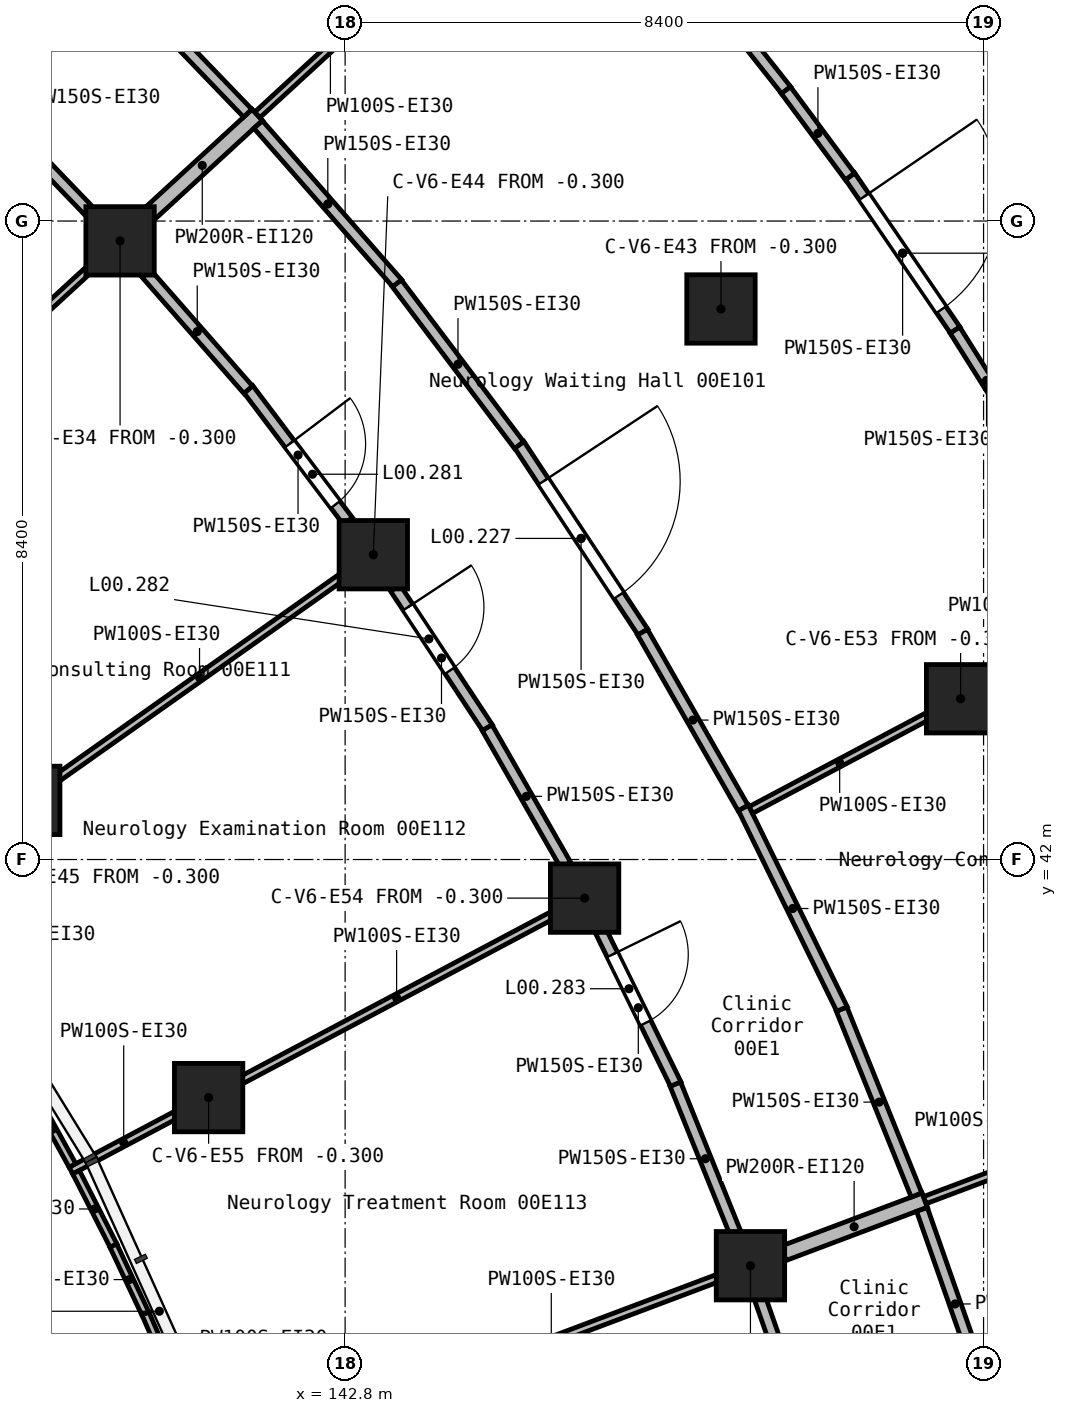
"""IFC4 building model, lengths in metres.
Left out: names, types, materials, properties, quantities, classifications, styles, units other than length and angle.
Written with IfcOpenShell. Run it as: python <this file> out.ifc"""

import sys

from ifc_helpers import new_model, si_unit, direction, frame, frame_2d, origin, origin_2d, place, context, subcontext, project, spatial, rectangle, extrude, element, fill, save


model = new_model("IFC4")
c1 = context("Model", 3, precision=1e-05, world=origin(), true_north=direction((0.0, 1.0)))
c2 = subcontext(c1, "Body", "Model", "MODEL_VIEW")
j1 = project(units=[si_unit("LENGTHUNIT", "METRE"), si_unit("PLANEANGLEUNIT", "RADIAN")], contexts=[c1])
p1 = place(None, origin())
s1 = spatial("IfcSite", under=j1, at=p1, CompositionType="ELEMENT")
p2 = place(p1, origin())
s2 = spatial("IfcBuilding", under=s1, at=p2, CompositionType="ELEMENT")
p3 = place(p2, origin())
s3 = spatial("IfcBuildingStorey", under=s2, at=p3, CompositionType="ELEMENT", Elevation=0.0)
for number, where, z_axis, x_axis in (
    (1, (138.598, 42.778, -0.3), (0.0, 0.0, 1.0), (1.0, 0.0, 0.0)),
    (2, (139.839, 50.139, -0.3), (0.0, 0.0, 1.0), (1.0, 0.0, 0.0)),
    (3, (141.004, 38.868, -0.3), (0.0, 0.0, 1.0), (1.0, 0.0, 0.0)),
    (4, (143.171, 46.01, -0.3), (0.0, 0.0, 1.0), (1.0, 0.0, 0.0)),
    (5, (145.951, 41.492, -0.3), (0.0, 0.0, 1.0), (1.0, 0.0, 0.0)),
    (6, (147.745, 49.243, -0.3), (0.0, 0.0, 1.0), (1.0, 0.0, 0.0)),
    (7, (148.133, 36.656, -0.3), (0.0, 0.0, 1.0), (1.0, 0.0, 0.0)),
    (8, (150.898, 44.115, -0.3), (0.0, 0.0, 1.0), (1.0, 0.0, 0.0)),
):
    element("IfcColumn", number, at=place(p3, frame(where, z_axis=z_axis, x_axis=x_axis)), inside=s3, PredefinedType="COLUMN", context=c2, shape_type="SweptSolid", body=[
        extrude(rectangle(XDim=0.9, YDim=0.9, at=origin_2d()), origin(), (0.0, 0.0, 1.0), 5.7),
    ])
p4 = place(p3, frame((140.196, 50.467, 0.0), z_axis=(0.0, 0.0, 1.0), x_axis=(0.736519787736, 0.676415997943, 0.0)))
e9 = element("IfcWall", 9, at=p4, inside=s3, PredefinedType="SOLIDWALL", context=c2, shape_type="SweptSolid", body=[
    extrude(rectangle(XDim=1.966, YDim=0.2, at=frame_2d((0.983, 0.0))), origin(), (0.0, 0.0, 1.0), 5.05),
])
p5 = place(p3, frame((148.567, 36.819, 0.0), z_axis=(0.0, 0.0, 1.0), x_axis=(0.935934561344, 0.352173958268, 0.0)))
e10 = element("IfcWall", 10, at=p5, inside=s3, PredefinedType="SOLIDWALL", context=c2, shape_type="SweptSolid", body=[
    extrude(rectangle(XDim=1.986, YDim=0.2, at=frame_2d((0.993, 0.0))), origin(), (0.0, 0.0, 1.0), 5.05),
])
p6 = place(p3, frame((148.038, 42.683, 0.0), z_axis=(0.0, 0.0, 1.0), x_axis=(0.440200278942, -0.897899612663, 0.0)))
e11 = element("IfcWall", 11, at=p6, inside=s3, PredefinedType="PARTITIONING", context=c2, shape_type="SweptSolid", body=[
    extrude(rectangle(XDim=2.958, YDim=0.15, at=frame_2d((1.479, 0.0))), origin(), (0.0, 0.0, 1.0), 5.05),
])
p7 = place(p3, frame((145.09, 47.458, 0.0), z_axis=(0.0, 0.0, 1.0), x_axis=(0.551018151494, -0.834493257447, 0.0)))
e12 = element("IfcWall", 12, at=p7, inside=s3, PredefinedType="PARTITIONING", context=c2, shape_type="SweptSolid", body=[
    extrude(rectangle(XDim=2.958, YDim=0.15, at=frame_2d((1.479, 0.0))), origin(), (0.0, 0.0, 1.0), 5.05),
])
p8 = place(p7, frame((0.579, 0.0, 0.0)))
e13 = element("IfcOpeningElement", 13, at=p8, cuts=e12, PredefinedType="OPENING", context=c2, shape_type="SweptSolid", body=[
    extrude(rectangle(XDim=1.8, YDim=2.1, at=frame_2d((0.9, 1.05))), frame((0.0, 0.085, 0.0), z_axis=(0.0, -1.0, 0.0), x_axis=(1.0, 0.0, 0.0)), (0.0, 0.0, 1.0), 0.17),
])
p9 = place(p3, frame((146.713, 44.992, 0.0), z_axis=(0.0, 0.0, 1.0), x_axis=(0.49622768999, -0.868192420888, 0.0)))
e14 = element("IfcWall", 14, at=p9, inside=s3, PredefinedType="PARTITIONING", context=c2, shape_type="SweptSolid", body=[
    extrude(rectangle(XDim=2.666, YDim=0.15, at=frame_2d((1.333, 0.0))), origin(), (0.0, 0.0, 1.0), 5.05),
])
p10 = place(p3, frame((141.656, 51.669, 0.0), z_axis=(0.0, 0.0, 1.0), x_axis=(0.659076402407, -0.752075990702, 0.0)))
e15 = element("IfcWall", 15, at=p10, inside=s3, PredefinedType="PARTITIONING", context=c2, shape_type="SweptSolid", body=[
    extrude(rectangle(XDim=2.78, YDim=0.15, at=frame_2d((1.39, 0.0))), origin(), (0.0, 0.0, 1.0), 5.05),
])
p11 = place(p3, frame((149.333, 40.03, 0.0), z_axis=(0.0, 0.0, 1.0), x_axis=(0.373865497673, -0.927482932269, 0.0)))
e16 = element("IfcWall", 16, at=p11, inside=s3, PredefinedType="PARTITIONING", context=c2, shape_type="SweptSolid", body=[
    extrude(rectangle(XDim=2.635, YDim=0.15, at=frame_2d((1.317, 0.0))), origin(), (0.0, 0.0, 1.0), 5.05),
])
p12 = place(p3, frame((143.481, 49.579, 0.0), z_axis=(0.0, 0.0, 1.0), x_axis=(0.602824021104, -0.797874175281, 0.0)))
e17 = element("IfcWall", 17, at=p12, inside=s3, PredefinedType="PARTITIONING", context=c2, shape_type="SweptSolid", body=[
    extrude(rectangle(XDim=2.666, YDim=0.15, at=frame_2d((1.333, 0.0))), origin(), (0.0, 0.0, 1.0), 5.05),
])
p13 = place(p3, frame((139.691, 53.718, 0.0), z_axis=(0.0, 0.0, 1.0), x_axis=(0.693447550136, -0.720507109757, 0.0)))
e18 = element("IfcWall", 18, at=p13, inside=s3, PredefinedType="PARTITIONING", context=c2, shape_type="SweptSolid", body=[
    extrude(rectangle(XDim=2.635, YDim=0.15, at=frame_2d((1.317, 0.0))), origin(), (0.0, 0.0, 1.0), 5.05),
])
p14 = place(p3, frame((150.39, 37.396, 0.0), z_axis=(0.0, 0.0, 1.0), x_axis=(0.330759074405, -0.943715229663, 0.0)))
e19 = element("IfcWall", 19, at=p14, inside=s3, PredefinedType="PARTITIONING", context=c2, shape_type="SweptSolid", body=[
    extrude(rectangle(XDim=2.634, YDim=0.15, at=frame_2d((1.317, 0.0))), origin(), (0.0, 0.0, 1.0), 5.05),
])
p15 = place(p3, frame((146.163, 41.06, 0.0), z_axis=(0.0, 0.0, 1.0), x_axis=(0.439946079235, -0.898024190858, 0.0)))
e20 = element("IfcWall", 20, at=p15, inside=s3, PredefinedType="PARTITIONING", context=c2, shape_type="SweptSolid", body=[
    extrude(rectangle(XDim=2.249, YDim=0.15, at=frame_2d((1.124, 0.0))), origin(), (0.0, 0.0, 1.0), 5.05),
])
p16 = place(p15, frame((0.346, 0.0, 0.0)))
e21 = element("IfcOpeningElement", 21, at=p16, cuts=e20, PredefinedType="OPENING", context=c2, shape_type="SweptSolid", body=[
    extrude(rectangle(XDim=1.0, YDim=2.1, at=frame_2d((0.5, 1.05))), frame((0.0, 0.085, 0.0), z_axis=(0.0, -1.0, 0.0), x_axis=(1.0, 0.0, 0.0)), (0.0, 0.0, 1.0), 0.17),
])
p17 = place(p3, frame((141.526, 48.188, 0.0), z_axis=(0.0, 0.0, 1.0), x_axis=(0.60280129331, -0.797891346477, 0.0)))
e22 = element("IfcWall", 22, at=p17, inside=s3, PredefinedType="PARTITIONING", context=c2, shape_type="SweptSolid", body=[
    extrude(rectangle(XDim=2.172, YDim=0.15, at=frame_2d((1.086, 0.0))), origin(), (0.0, 0.0, 1.0), 5.05),
])
p18 = place(p17, frame((0.902, 0.0, 0.0)))
e23 = element("IfcOpeningElement", 23, at=p18, cuts=e22, PredefinedType="OPENING", context=c2, shape_type="SweptSolid", body=[
    extrude(rectangle(XDim=1.0, YDim=2.1, at=frame_2d((0.5, 1.05))), frame((0.0, 0.085, 0.0), z_axis=(0.0, -1.0, 0.0), x_axis=(1.0, 0.0, 0.0)), (0.0, 0.0, 1.0), 0.17),
])
p19 = place(p3, frame((143.462, 45.57, 0.0), z_axis=(0.0, 0.0, 1.0), x_axis=(0.550880835548, -0.834583911315, 0.0)))
e24 = element("IfcWall", 24, at=p19, inside=s3, PredefinedType="PARTITIONING", context=c2, shape_type="SweptSolid", body=[
    extrude(rectangle(XDim=2.201, YDim=0.15, at=frame_2d((1.101, 0.0))), origin(), (0.0, 0.0, 1.0), 5.05),
])
p20 = place(p19, frame((0.299, 0.0, 0.0)))
e25 = element("IfcOpeningElement", 25, at=p20, cuts=e24, PredefinedType="OPENING", context=c2, shape_type="SweptSolid", body=[
    extrude(rectangle(XDim=1.0, YDim=2.1, at=frame_2d((0.5, 1.05))), frame((0.0, 0.085, 0.0), z_axis=(0.0, -1.0, 0.0), x_axis=(1.0, 0.0, 0.0)), (0.0, 0.0, 1.0), 0.17),
])
p21 = place(p3, frame((144.668, 43.734, 0.0), z_axis=(0.0, 0.0, 1.0), x_axis=(0.496694973164, -0.867925171679, 0.0)))
e26 = element("IfcWall", 26, at=p21, inside=s3, PredefinedType="PARTITIONING", context=c2, shape_type="SweptSolid", body=[
    extrude(rectangle(XDim=2.08, YDim=0.15, at=frame_2d((1.04, 0.0))), origin(), (0.0, 0.0, 1.0), 5.05),
])
p22 = place(p3, frame((147.145, 39.043, 0.0), z_axis=(0.0, 0.0, 1.0), x_axis=(0.373899406404, -0.927469263043, 0.0)))
e27 = element("IfcWall", 27, at=p22, inside=s3, PredefinedType="PARTITIONING", context=c2, shape_type="SweptSolid", body=[
    extrude(rectangle(XDim=2.113, YDim=0.15, at=frame_2d((1.057, 0.0))), origin(), (0.0, 0.0, 1.0), 5.05),
])
p23 = place(p3, frame((148.257, 36.232, 0.0), z_axis=(0.0, 0.0, 1.0), x_axis=(0.330477279651, -0.943813947574, 0.0)))
e28 = element("IfcWall", 28, at=p23, inside=s3, PredefinedType="PARTITIONING", context=c2, shape_type="SweptSolid", body=[
    extrude(rectangle(XDim=2.143, YDim=0.15, at=frame_2d((1.072, 0.0))), origin(), (0.0, 0.0, 1.0), 5.05),
])
p24 = place(p3, frame((140.184, 49.71, 0.0), z_axis=(0.0, 0.0, 1.0), x_axis=(0.659209376091, -0.751959439381, 0.0)))
e29 = element("IfcWall", 29, at=p24, inside=s3, PredefinedType="PARTITIONING", context=c2, shape_type="SweptSolid", body=[
    extrude(rectangle(XDim=2.035, YDim=0.15, at=frame_2d((1.017, 0.0))), origin(), (0.0, 0.0, 1.0), 5.05),
])
p25 = place(p3, frame((138.031, 51.985, 0.0), z_axis=(0.0, 0.0, 1.0), x_axis=(0.693216793474, -0.7207291289, 0.0)))
e30 = element("IfcWall", 30, at=p25, inside=s3, PredefinedType="PARTITIONING", context=c2, shape_type="SweptSolid", body=[
    extrude(rectangle(XDim=2.076, YDim=0.15, at=frame_2d((1.038, 0.0))), origin(), (0.0, 0.0, 1.0), 5.05),
])
p26 = place(p3, frame((149.443, 50.99, 0.0), z_axis=(0.0, 0.0, 1.0), x_axis=(0.564305795339, -0.825565847977, 0.0)))
e31 = element("IfcWall", 31, at=p26, inside=s3, PredefinedType="PARTITIONING", context=c2, shape_type="SweptSolid", body=[
    extrude(rectangle(XDim=2.454, YDim=0.15, at=frame_2d((1.227, 0.0))), origin(), (0.0, 0.0, 1.0), 5.05),
])
p27 = place(p26, frame((0.327, 0.0, 0.0)))
e32 = element("IfcOpeningElement", 32, at=p27, cuts=e31, PredefinedType="OPENING", context=c2, shape_type="SweptSolid", body=[
    extrude(rectangle(XDim=1.8, YDim=2.1, at=frame_2d((0.9, 1.05))), frame((0.0, 0.085, 0.0), z_axis=(0.0, -1.0, 0.0), x_axis=(1.0, 0.0, 0.0)), (0.0, 0.0, 1.0), 0.17),
])
p28 = place(p3, frame((150.823, 48.965, 0.0), z_axis=(0.0, 0.0, 1.0), x_axis=(0.531963557529, -0.846767248694, 0.0)))
e33 = element("IfcWall", 33, at=p28, inside=s3, PredefinedType="PARTITIONING", context=c2, shape_type="SweptSolid", body=[
    extrude(rectangle(XDim=1.563, YDim=0.15, at=frame_2d((0.781, 0.0))), origin(), (0.0, 0.0, 1.0), 5.05),
])
p29 = place(p3, frame((147.542, 53.462, 0.0), z_axis=(0.0, 0.0, 1.0), x_axis=(0.620542012859, -0.784173201708, 0.0)))
e34 = element("IfcWall", 34, at=p29, inside=s3, PredefinedType="PARTITIONING", context=c2, shape_type="SweptSolid", body=[
    extrude(rectangle(XDim=1.71, YDim=0.15, at=frame_2d((0.855, 0.0))), origin(), (0.0, 0.0, 1.0), 5.05),
])
p30 = place(p3, frame((148.599, 52.122, 0.0), z_axis=(0.0, 0.0, 1.0), x_axis=(0.595875663086, -0.803076705017, 0.0)))
e35 = element("IfcWall", 35, at=p30, inside=s3, PredefinedType="PARTITIONING", context=c2, shape_type="SweptSolid", body=[
    extrude(rectangle(XDim=1.414, YDim=0.15, at=frame_2d((0.707, 0.0))), origin(), (0.0, 0.0, 1.0), 5.05),
])
p31 = place(p3, frame((139.193, 37.908, 0.0), z_axis=(0.0, 0.0, 1.0), x_axis=(0.883481589726, 0.468465879884, 0.0)))
e36 = element("IfcWall", 36, at=p31, inside=s3, PredefinedType="PARTITIONING", context=c2, shape_type="SweptSolid", body=[
    extrude(rectangle(XDim=1.571, YDim=0.1, at=frame_2d((0.786, 0.0))), origin(), (0.0, 0.0, 1.0), 5.05),
])
p32 = place(p3, frame((141.427, 39.093, 0.0), z_axis=(0.0, 0.0, 1.0), x_axis=(0.88344099274, 0.46854243388, 0.0)))
e37 = element("IfcWall", 37, at=p32, inside=s3, PredefinedType="PARTITIONING", context=c2, shape_type="SweptSolid", body=[
    extrude(rectangle(XDim=4.642, YDim=0.1, at=frame_2d((2.321, 0.0))), origin(), (0.0, 0.0, 1.0), 5.05),
])
p33 = place(p3, frame((139.026, 43.081, 0.0), z_axis=(0.0, 0.0, 1.0), x_axis=(0.816637661001, 0.577150700108, 0.0)))
e38 = element("IfcWall", 38, at=p33, inside=s3, PredefinedType="PARTITIONING", context=c2, shape_type="SweptSolid", body=[
    extrude(rectangle(XDim=4.551, YDim=0.1, at=frame_2d((2.275, 0.0))), origin(), (0.0, 0.0, 1.0), 5.05),
])
p34 = place(p3, frame((143.309, 34.84, 0.0), z_axis=(0.0, 0.0, 1.0), x_axis=(0.935891610639, 0.352288082591, 0.0)))
e39 = element("IfcWall", 39, at=p34, inside=s3, PredefinedType="PARTITIONING", context=c2, shape_type="SweptSolid", body=[
    extrude(rectangle(XDim=4.708, YDim=0.1, at=frame_2d((2.354, 0.0))), origin(), (0.0, 0.0, 1.0), 5.05),
])
p35 = place(p3, frame((136.111, 46.715, 0.0), z_axis=(0.0, 0.0, 1.0), x_axis=(0.736475017651, 0.676464742892, 0.0)))
e40 = element("IfcWall", 40, at=p35, inside=s3, PredefinedType="PARTITIONING", context=c2, shape_type="SweptSolid", body=[
    extrude(rectangle(XDim=4.524, YDim=0.1, at=frame_2d((2.262, 0.0))), origin(), (0.0, 0.0, 1.0), 5.05),
])
p36 = place(p3, frame((150.427, 37.519, 0.0), z_axis=(0.0, 0.0, 1.0), x_axis=(0.935894141782, 0.352281358262, 0.0)))
e41 = element("IfcWall", 41, at=p36, inside=s3, PredefinedType="PARTITIONING", context=c2, shape_type="SweptSolid", body=[
    extrude(rectangle(XDim=2.703, YDim=0.1, at=frame_2d((1.352, 0.0))), origin(), (0.0, 0.0, 1.0), 5.05),
])
p37 = place(p3, frame((141.645, 51.798, 0.0), z_axis=(0.0, 0.0, 1.0), x_axis=(0.73658314114, 0.676347008709, 0.0)))
e42 = element("IfcWall", 42, at=p37, inside=s3, PredefinedType="PARTITIONING", context=c2, shape_type="SweptSolid", body=[
    extrude(rectangle(XDim=2.61, YDim=0.1, at=frame_2d((1.305, 0.0))), origin(), (0.0, 0.0, 1.0), 5.05),
])
p38 = place(p3, frame((148.139, 42.652, 0.0), z_axis=(0.0, 0.0, 1.0), x_axis=(0.883500310686, 0.468430572249, 0.0)))
e43 = element("IfcWall", 43, at=p38, inside=s3, PredefinedType="PARTITIONING", context=c2, shape_type="SweptSolid", body=[
    extrude(rectangle(XDim=2.645, YDim=0.1, at=frame_2d((1.322, 0.0))), origin(), (0.0, 0.0, 1.0), 5.05),
])
p39 = place(p3, frame((139.26, 37.886, 0.0), z_axis=(0.0, 0.0, 1.0), x_axis=(0.454222477174, -0.890888287738, 0.0)))
e44 = element("IfcWall", 44, at=p39, inside=s3, PredefinedType="PARTITIONING", context=c2, shape_type="SweptSolid", body=[
    extrude(rectangle(XDim=1.085, YDim=0.1, at=frame_2d((0.542, 0.0))), origin(), (0.0, 0.0, 1.0), 5.05),
])
p40 = place(p3, frame((138.689, 38.925, 0.0), z_axis=(0.0, 0.0, 1.0), x_axis=(0.482886802116, -0.875682782942, 0.0)))
e45 = element("IfcWall", 45, at=p40, inside=s3, PredefinedType="PARTITIONING", context=c2, shape_type="SweptSolid", body=[
    extrude(rectangle(XDim=1.084, YDim=0.1, at=frame_2d((0.542, 0.0))), origin(), (0.0, 0.0, 1.0), 5.05),
])
p41 = place(p3, frame((140.172, 36.029, 0.0), z_axis=(0.0, 0.0, 1.0), x_axis=(0.396479436871, -0.918043602526, 0.0)))
e46 = element("IfcWall", 46, at=p41, inside=s3, PredefinedType="PARTITIONING", context=c2, shape_type="SweptSolid", body=[
    extrude(rectangle(XDim=1.185, YDim=0.1, at=frame_2d((0.592, 0.0))), origin(), (0.0, 0.0, 1.0), 5.05),
])
p42 = place(p3, frame((139.751, 36.92, 0.0), z_axis=(0.0, 0.0, 1.0), x_axis=(0.426023266387, -0.904712206448, 0.0)))
e47 = element("IfcWall", 47, at=p42, inside=s3, PredefinedType="PARTITIONING", context=c2, shape_type="SweptSolid", body=[
    extrude(rectangle(XDim=0.987, YDim=0.1, at=frame_2d((0.494, 0.0))), origin(), (0.0, 0.0, 1.0), 5.05),
])
p43 = place(p8, frame((1.8, 0.0, 0.0), z_axis=(0.0, 0.0, 1.0), x_axis=(-1.0, 0.0, 0.0)))
e48 = element("IfcDoor", 48, at=p43, inside=s3, OperationType="DOUBLE_DOOR_SINGLE_SWING", PredefinedType="DOOR", context=c2, shape_type="SweptSolid", body=[
    extrude(rectangle(XDim=1.8, YDim=2.1, at=frame_2d((0.9, 1.05))), frame((0.0, 0.025, 0.0), z_axis=(0.0, -1.0, 0.0), x_axis=(1.0, 0.0, 0.0)), (0.0, 0.0, 1.0), 0.05),
])
fill(e13, e48)
p44 = place(p27, origin())
e49 = element("IfcDoor", 49, at=p44, inside=s3, OperationType="DOUBLE_DOOR_SINGLE_SWING", PredefinedType="DOOR", context=c2, shape_type="SweptSolid", body=[
    extrude(rectangle(XDim=1.8, YDim=2.1, at=frame_2d((0.9, 1.05))), frame((0.0, 0.025, 0.0), z_axis=(0.0, -1.0, 0.0), x_axis=(1.0, 0.0, 0.0)), (0.0, 0.0, 1.0), 0.05),
])
fill(e32, e49)
p45 = place(p18, frame((1.0, 0.0, 0.0), z_axis=(0.0, 0.0, 1.0), x_axis=(-1.0, 0.0, 0.0)))
e50 = element("IfcDoor", 50, at=p45, inside=s3, OperationType="SINGLE_SWING_LEFT", PredefinedType="DOOR", context=c2, shape_type="SweptSolid", body=[
    extrude(rectangle(XDim=1.0, YDim=2.1, at=frame_2d((0.5, 1.05))), frame((0.0, 0.025, 0.0), z_axis=(0.0, -1.0, 0.0), x_axis=(1.0, 0.0, 0.0)), (0.0, 0.0, 1.0), 0.05),
])
fill(e23, e50)
p46 = place(p20, frame((1.0, 0.0, 0.0), z_axis=(0.0, 0.0, 1.0), x_axis=(-1.0, 0.0, 0.0)))
e51 = element("IfcDoor", 51, at=p46, inside=s3, OperationType="SINGLE_SWING_RIGHT", PredefinedType="DOOR", context=c2, shape_type="SweptSolid", body=[
    extrude(rectangle(XDim=1.0, YDim=2.1, at=frame_2d((0.5, 1.05))), frame((0.0, 0.025, 0.0), z_axis=(0.0, -1.0, 0.0), x_axis=(1.0, 0.0, 0.0)), (0.0, 0.0, 1.0), 0.05),
])
fill(e25, e51)
p47 = place(p16, frame((1.0, 0.0, 0.0), z_axis=(0.0, 0.0, 1.0), x_axis=(-1.0, 0.0, 0.0)))
e52 = element("IfcDoor", 52, at=p47, inside=s3, OperationType="SINGLE_SWING_RIGHT", PredefinedType="DOOR", context=c2, shape_type="SweptSolid", body=[
    extrude(rectangle(XDim=1.0, YDim=2.1, at=frame_2d((0.5, 1.05))), frame((0.0, 0.025, 0.0), z_axis=(0.0, -1.0, 0.0), x_axis=(1.0, 0.0, 0.0)), (0.0, 0.0, 1.0), 0.05),
])
fill(e21, e52)
save(model, sys.argv[1])
